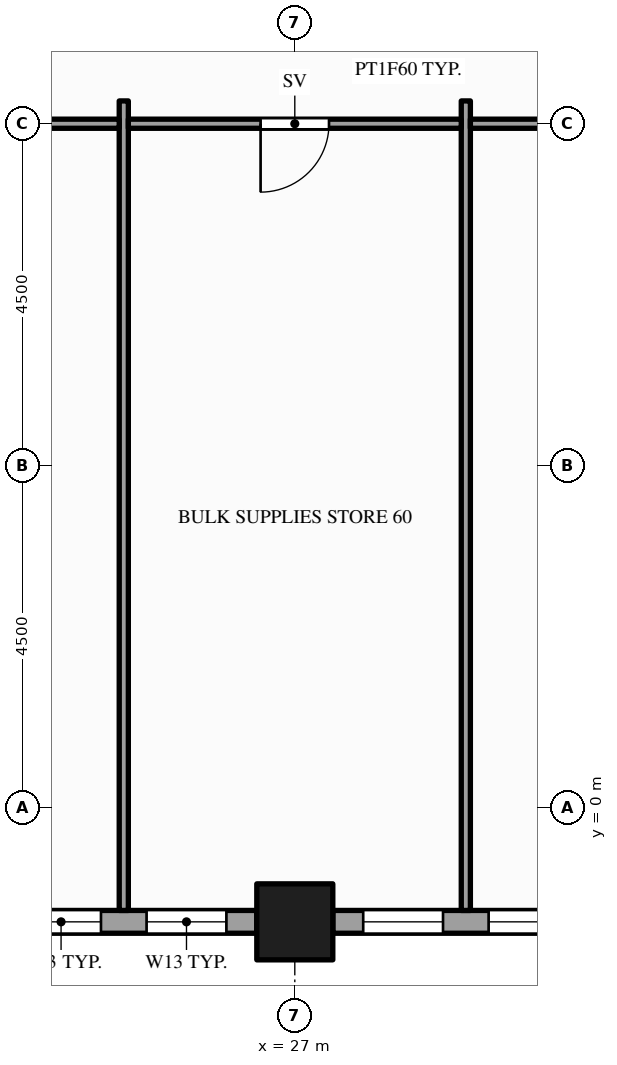
"""IFC4 building model, lengths in metres.
Left out: names, types, materials, properties, quantities, classifications, styles, units other than length and angle.
Written with IfcOpenShell. Run it as: python <this file> out.ifc"""

import sys

from ifc_helpers import new_model, si_unit, direction, frame, frame_2d, origin, origin_2d, place, context, subcontext, project, spatial, rectangle, hollow_rectangle, extrude, element, fill, save


model = new_model("IFC4")
c1 = context("Model", 3, precision=1e-05, world=origin(), true_north=direction((0.0, 1.0)))
c2 = subcontext(c1, "Body", "Model", "MODEL_VIEW")
j1 = project(units=[si_unit("LENGTHUNIT", "METRE"), si_unit("PLANEANGLEUNIT", "RADIAN")], contexts=[c1])
p1 = place(None, origin())
s1 = spatial("IfcSite", under=j1, at=p1, CompositionType="ELEMENT")
p2 = place(p1, origin())
s2 = spatial("IfcBuilding", under=s1, at=p2, CompositionType="ELEMENT")
p3 = place(p2, frame((0.0, 0.0, 119.0)))
s3 = spatial("IfcBuildingStorey", under=s2, at=p3, CompositionType="ELEMENT", Elevation=119.0)
p4 = place(p3, frame((27.0, -1.5, -0.15), z_axis=(0.0, 0.0, 1.0), x_axis=(1.0, 0.0, 0.0)))
e1 = element("IfcColumn", 1, at=p4, inside=s3, PredefinedType="COLUMN", context=c2, shape_type="SweptSolid", body=[
    extrude(hollow_rectangle(XDim=1.0, YDim=1.0, WallThickness=0.05, at=origin_2d()), origin(), (0.0, 0.0, 1.0), 4.0),
])
p5 = place(p3, frame((23.0, -1.5, 0.0), z_axis=(0.0, 0.0, 1.0), x_axis=(1.0, 0.0, 0.0)))
e2 = element("IfcWall", 2, at=p5, inside=s3, PredefinedType="STANDARD", context=c2, shape_type="SweptSolid", body=[
    extrude(rectangle(XDim=3.5, YDim=0.3, at=frame_2d((1.75, 0.0))), origin(), (0.0, 0.0, 1.0), 3.154),
])
p6 = place(p5, frame((0.4, 0.0, 0.9)))
e3 = element("IfcOpeningElement", 3, at=p6, cuts=e2, PredefinedType="OPENING", context=c2, shape_type="SweptSolid", body=[
    extrude(rectangle(XDim=1.05, YDim=2.0, at=frame_2d((0.525, 1.0))), frame((0.0, 0.16, 0.0), z_axis=(0.0, -1.0, 0.0), x_axis=(1.0, 0.0, 0.0)), (0.0, 0.0, 1.0), 0.32),
])
p7 = place(p5, frame((2.05, 0.0, 0.9)))
e4 = element("IfcOpeningElement", 4, at=p7, cuts=e2, PredefinedType="OPENING", context=c2, shape_type="SweptSolid", body=[
    extrude(rectangle(XDim=1.05, YDim=2.0, at=frame_2d((0.525, 1.0))), frame((0.0, 0.16, 0.0), z_axis=(0.0, -1.0, 0.0), x_axis=(1.0, 0.0, 0.0)), (0.0, 0.0, 1.0), 0.32),
])
p8 = place(p3, frame((27.5, -1.5, 0.0), z_axis=(0.0, 0.0, 1.0), x_axis=(1.0, 0.0, 0.0)))
e5 = element("IfcWall", 5, at=p8, inside=s3, PredefinedType="STANDARD", context=c2, shape_type="SweptSolid", body=[
    extrude(rectangle(XDim=3.5, YDim=0.3, at=frame_2d((1.75, 0.0))), origin(), (0.0, 0.0, 1.0), 3.154),
])
p9 = place(p8, frame((0.4, 0.0, 0.9)))
e6 = element("IfcOpeningElement", 6, at=p9, cuts=e5, PredefinedType="OPENING", context=c2, shape_type="SweptSolid", body=[
    extrude(rectangle(XDim=1.05, YDim=2.0, at=frame_2d((0.525, 1.0))), frame((0.0, 0.16, 0.0), z_axis=(0.0, -1.0, 0.0), x_axis=(1.0, 0.0, 0.0)), (0.0, 0.0, 1.0), 0.32),
])
p10 = place(p8, frame((2.05, 0.0, 0.9)))
e7 = element("IfcOpeningElement", 7, at=p10, cuts=e5, PredefinedType="OPENING", context=c2, shape_type="SweptSolid", body=[
    extrude(rectangle(XDim=1.05, YDim=2.0, at=frame_2d((0.525, 1.0))), frame((0.0, 0.16, 0.0), z_axis=(0.0, -1.0, 0.0), x_axis=(1.0, 0.0, 0.0)), (0.0, 0.0, 1.0), 0.32),
])
p11 = place(p3, frame((24.75, -1.35, 0.0), z_axis=(0.0, 0.0, 1.0), x_axis=(0.0, 1.0, 0.0)))
e8 = element("IfcWall", 8, at=p11, inside=s3, PredefinedType="PARTITIONING", context=c2, shape_type="SweptSolid", body=[
    extrude(rectangle(XDim=10.65, YDim=0.12, at=frame_2d((5.325, 0.0))), origin(), (0.0, 0.0, 1.0), 2.76),
])
p12 = place(p3, frame((29.25, -1.35, 0.0), z_axis=(0.0, 0.0, 1.0), x_axis=(0.0, 1.0, 0.0)))
e9 = element("IfcWall", 9, at=p12, inside=s3, PredefinedType="PARTITIONING", context=c2, shape_type="SweptSolid", body=[
    extrude(rectangle(XDim=10.65, YDim=0.12, at=frame_2d((5.325, 0.0))), origin(), (0.0, 0.0, 1.0), 2.938),
])
p13 = place(p3, frame((18.06, 9.0, 0.0), z_axis=(0.0, 0.0, 1.0), x_axis=(1.0, 0.0, 0.0)))
e10 = element("IfcWall", 10, at=p13, inside=s3, PredefinedType="PARTITIONING", context=c2, shape_type="SweptSolid", body=[
    extrude(rectangle(XDim=6.63, YDim=0.12, at=frame_2d((3.315, 0.0))), origin(), (0.0, 0.0, 1.0), 2.76),
])
p14 = place(p13, frame((2.715, 0.0, 0.0)))
e11 = element("IfcOpeningElement", 11, at=p14, cuts=e10, PredefinedType="OPENING", context=c2, shape_type="SweptSolid", body=[
    extrude(rectangle(XDim=1.2, YDim=2.1, at=frame_2d((0.6, 1.05))), frame((0.0, 0.07, 0.0), z_axis=(0.0, -1.0, 0.0), x_axis=(1.0, 0.0, 0.0)), (0.0, 0.0, 1.0), 0.14),
])
p15 = place(p3, frame((24.81, 9.0, 0.0), z_axis=(0.0, 0.0, 1.0), x_axis=(1.0, 0.0, 0.0)))
e12 = element("IfcWall", 12, at=p15, inside=s3, PredefinedType="PARTITIONING", context=c2, shape_type="SweptSolid", body=[
    extrude(rectangle(XDim=4.38, YDim=0.12, at=frame_2d((2.19, 0.0))), origin(), (0.0, 0.0, 1.0), 2.76),
])
p16 = place(p15, frame((1.74, 0.0, 0.0)))
e13 = element("IfcOpeningElement", 13, at=p16, cuts=e12, PredefinedType="OPENING", context=c2, shape_type="SweptSolid", body=[
    extrude(rectangle(XDim=0.9, YDim=2.1, at=frame_2d((0.45, 1.05))), frame((0.0, 0.07, 0.0), z_axis=(0.0, -1.0, 0.0), x_axis=(1.0, 0.0, 0.0)), (0.0, 0.0, 1.0), 0.14),
])
p17 = place(p3, frame((29.31, 9.0, 0.0), z_axis=(0.0, 0.0, 1.0), x_axis=(1.0, 0.0, 0.0)))
e14 = element("IfcWall", 14, at=p17, inside=s3, PredefinedType="PARTITIONING", context=c2, shape_type="SweptSolid", body=[
    extrude(rectangle(XDim=6.63, YDim=0.12, at=frame_2d((3.315, 0.0))), origin(), (0.0, 0.0, 1.0), 2.938),
])
p18 = place(p17, frame((2.815, 0.0, 0.0)))
e15 = element("IfcOpeningElement", 15, at=p18, cuts=e14, PredefinedType="OPENING", context=c2, shape_type="SweptSolid", body=[
    extrude(rectangle(XDim=1.0, YDim=2.1, at=frame_2d((0.5, 1.05))), frame((0.0, 0.07, 0.0), z_axis=(0.0, -1.0, 0.0), x_axis=(1.0, 0.0, 0.0)), (0.0, 0.0, 1.0), 0.14),
])
p19 = place(p6, origin())
e16 = element("IfcWindow", 16, at=p19, inside=s3, PartitioningType="SINGLE_PANEL", PredefinedType="WINDOW", context=c2, shape_type="SweptSolid", body=[
    extrude(rectangle(XDim=1.05, YDim=2.0, at=frame_2d((0.525, 1.0))), frame((0.0, 0.03, 0.0), z_axis=(0.0, -1.0, 0.0), x_axis=(1.0, 0.0, 0.0)), (0.0, 0.0, 1.0), 0.06),
])
fill(e3, e16)
p20 = place(p7, origin())
e17 = element("IfcWindow", 17, at=p20, inside=s3, PartitioningType="SINGLE_PANEL", PredefinedType="WINDOW", context=c2, shape_type="SweptSolid", body=[
    extrude(rectangle(XDim=1.05, YDim=2.0, at=frame_2d((0.525, 1.0))), frame((0.0, 0.03, 0.0), z_axis=(0.0, -1.0, 0.0), x_axis=(1.0, 0.0, 0.0)), (0.0, 0.0, 1.0), 0.06),
])
fill(e4, e17)
p21 = place(p9, origin())
e18 = element("IfcWindow", 18, at=p21, inside=s3, PartitioningType="SINGLE_PANEL", PredefinedType="WINDOW", context=c2, shape_type="SweptSolid", body=[
    extrude(rectangle(XDim=1.05, YDim=2.0, at=frame_2d((0.525, 1.0))), frame((0.0, 0.03, 0.0), z_axis=(0.0, -1.0, 0.0), x_axis=(1.0, 0.0, 0.0)), (0.0, 0.0, 1.0), 0.06),
])
fill(e6, e18)
p22 = place(p10, origin())
e19 = element("IfcWindow", 19, at=p22, inside=s3, PartitioningType="SINGLE_PANEL", PredefinedType="WINDOW", context=c2, shape_type="SweptSolid", body=[
    extrude(rectangle(XDim=1.05, YDim=2.0, at=frame_2d((0.525, 1.0))), frame((0.0, 0.03, 0.0), z_axis=(0.0, -1.0, 0.0), x_axis=(1.0, 0.0, 0.0)), (0.0, 0.0, 1.0), 0.06),
])
fill(e7, e19)
p23 = place(p16, origin())
e20 = element("IfcDoor", 20, at=p23, inside=s3, OperationType="SINGLE_SWING_LEFT", PredefinedType="DOOR", context=c2, shape_type="SweptSolid", body=[
    extrude(rectangle(XDim=0.9, YDim=2.1, at=frame_2d((0.45, 1.05))), frame((0.0, 0.025, 0.0), z_axis=(0.0, -1.0, 0.0), x_axis=(1.0, 0.0, 0.0)), (0.0, 0.0, 1.0), 0.05),
])
fill(e13, e20)
save(model, sys.argv[1])
